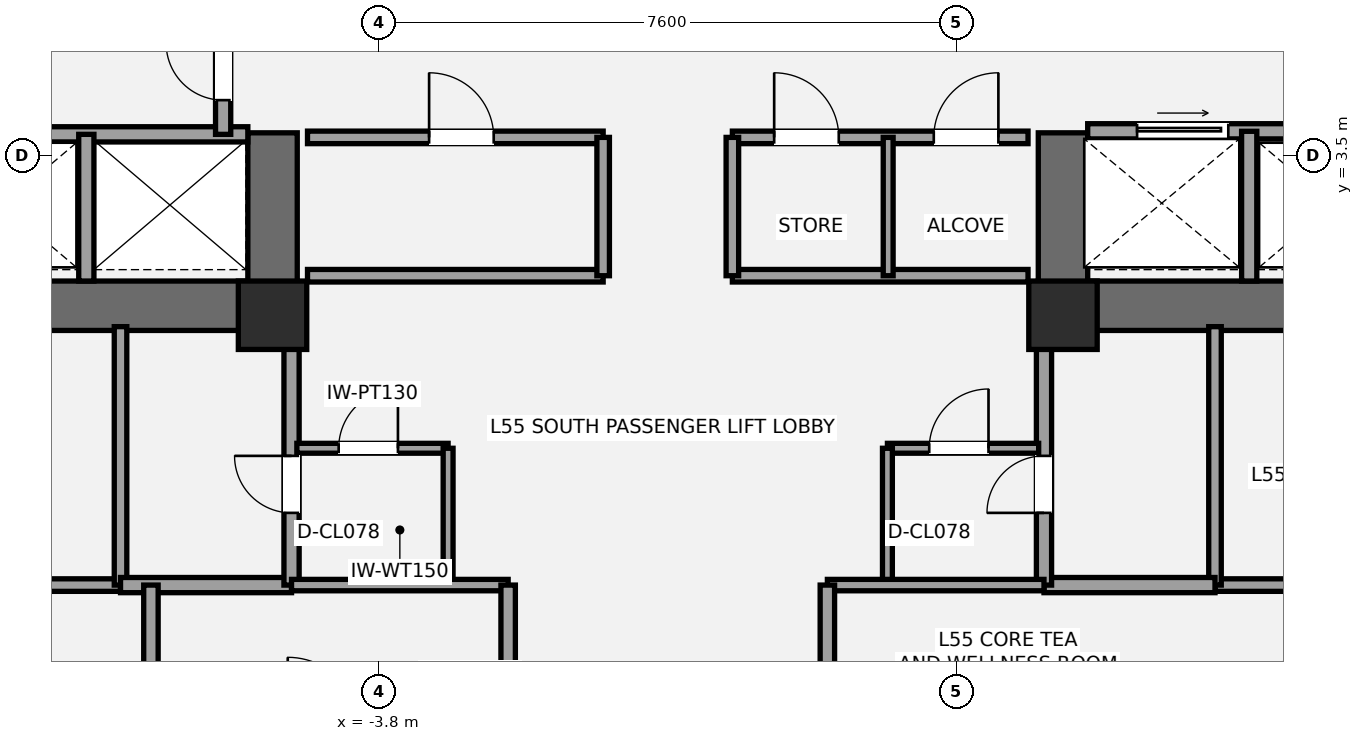
"""IFC4 building model, lengths in metres.
Left out: names, types, materials, properties, quantities, classifications, styles, units other than length and angle.
Written with IfcOpenShell. Run it as: python <this file> out.ifc"""

import sys

from ifc_helpers import new_model, si_unit, direction, frame, frame_2d, origin, origin_2d, place, context, subcontext, project, spatial, rectangle, extrude, element, fill, save


model = new_model("IFC4")
c1 = context("Model", 3, precision=1e-05, world=origin(), true_north=direction((0.0, 1.0)))
c2 = subcontext(c1, "Body", "Model", "MODEL_VIEW")
j1 = project(units=[si_unit("LENGTHUNIT", "METRE"), si_unit("PLANEANGLEUNIT", "RADIAN")], contexts=[c1])
p1 = place(None, origin())
s1 = spatial("IfcSite", under=j1, at=p1, CompositionType="ELEMENT")
p2 = place(p1, origin())
s2 = spatial("IfcBuilding", under=s1, at=p2, CompositionType="ELEMENT")
p3 = place(p2, frame((0.0, 0.0, 198.2)))
s3 = spatial("IfcBuildingStorey", under=s2, at=p3, CompositionType="ELEMENT", Elevation=198.2)
p4 = place(p3, frame((-4.875, 1.525, 0.0), z_axis=(0.0, 0.0, 1.0), x_axis=(-1.0, 0.0, 0.0)))
e1 = element("IfcWall", 1, at=p4, inside=s3, PredefinedType="SHEAR", context=c2, shape_type="SweptSolid", body=[
    extrude(rectangle(XDim=8.925, YDim=0.65, at=frame_2d((4.462, 0.0))), origin(), (0.0, 0.0, 1.0), 3.2),
])
p5 = place(p4, frame((5.425, 0.0, 0.0)))
e2 = element("IfcOpeningElement", 2, at=p5, cuts=e1, PredefinedType="OPENING", context=c2, shape_type="SweptSolid", body=[
    extrude(rectangle(XDim=1.05, YDim=2.15, at=frame_2d((0.525, 1.075))), frame((0.0, 0.335, 0.0), z_axis=(0.0, -1.0, 0.0), x_axis=(1.0, 0.0, 0.0)), (0.0, 0.0, 1.0), 0.67),
])
p6 = place(p4, frame((3.755, 0.0, 0.0)))
e3 = element("IfcOpeningElement", 3, at=p6, cuts=e1, PredefinedType="OPENING", context=c2, shape_type="SweptSolid", body=[
    extrude(rectangle(XDim=1.1, YDim=2.2, at=frame_2d((0.55, 1.1))), frame((0.0, 0.335, 0.0), z_axis=(0.0, -1.0, 0.0), x_axis=(1.0, 0.0, 0.0)), (0.0, 0.0, 1.0), 0.67),
])
p7 = place(p3, frame((-5.2, 1.2, 0.0), z_axis=(0.0, 0.0, 1.0), x_axis=(0.0, 1.0, 0.0)))
e4 = element("IfcWall", 4, at=p7, inside=s3, PredefinedType="SHEAR", context=c2, shape_type="SweptSolid", body=[
    extrude(rectangle(XDim=2.6, YDim=0.65, at=frame_2d((1.3, 0.0))), origin(), (0.0, 0.0, 1.0), 3.2),
])
p8 = place(p3, frame((13.8, 1.525, 0.0), z_axis=(0.0, 0.0, 1.0), x_axis=(-1.0, 0.0, 0.0)))
e5 = element("IfcWall", 5, at=p8, inside=s3, PredefinedType="SHEAR", context=c2, shape_type="SweptSolid", body=[
    extrude(rectangle(XDim=8.925, YDim=0.65, at=frame_2d((4.462, 0.0))), origin(), (0.0, 0.0, 1.0), 3.2),
])
p9 = place(p8, frame((2.45, 0.0, 0.0)))
e6 = element("IfcOpeningElement", 6, at=p9, cuts=e5, PredefinedType="OPENING", context=c2, shape_type="SweptSolid", body=[
    extrude(rectangle(XDim=1.05, YDim=2.15, at=frame_2d((0.525, 1.075))), frame((0.0, 0.335, 0.0), z_axis=(0.0, -1.0, 0.0), x_axis=(1.0, 0.0, 0.0)), (0.0, 0.0, 1.0), 0.67),
])
p10 = place(p8, frame((4.45, 0.0, 0.0)))
e7 = element("IfcOpeningElement", 7, at=p10, cuts=e5, PredefinedType="OPENING", context=c2, shape_type="SweptSolid", body=[
    extrude(rectangle(XDim=1.1, YDim=2.2, at=frame_2d((0.55, 1.1))), frame((0.0, 0.335, 0.0), z_axis=(0.0, -1.0, 0.0), x_axis=(1.0, 0.0, 0.0)), (0.0, 0.0, 1.0), 0.67),
])
p11 = place(p3, frame((5.2, 1.2, 0.0), z_axis=(0.0, 0.0, 1.0), x_axis=(0.0, 1.0, 0.0)))
e8 = element("IfcWall", 8, at=p11, inside=s3, PredefinedType="SHEAR", context=c2, shape_type="SweptSolid", body=[
    extrude(rectangle(XDim=2.6, YDim=0.65, at=frame_2d((1.3, 0.0))), origin(), (0.0, 0.0, 1.0), 3.2),
])
for number, where, z_axis, x_axis in (
    (9, (-5.2, 1.4, 0.0), (0.0, 0.0, 1.0), (1.0, 0.0, 0.0)),
    (10, (5.2, 1.4, 0.0), (0.0, 0.0, 1.0), (1.0, 0.0, 0.0)),
):
    element("IfcColumn", number, at=place(p3, frame(where, z_axis=z_axis, x_axis=x_axis)), inside=s3, PredefinedType="COLUMN", context=c2, shape_type="SweptSolid", body=[
        extrude(rectangle(XDim=0.9, YDim=0.9, at=origin_2d()), origin(), (0.0, 0.0, 1.0), 3.2),
    ])
p12 = place(p3, frame((-13.45, -2.15, 0.0), z_axis=(0.0, 0.0, 1.0), x_axis=(1.0, 0.0, 0.0)))
e11 = element("IfcWall", 11, at=p12, inside=s3, PredefinedType="PARTITIONING", context=c2, shape_type="SweptSolid", body=[
    extrude(rectangle(XDim=6.25, YDim=0.165, at=frame_2d((3.125, 0.0))), origin(), (0.0, 0.0, 1.0), 2.96),
])
p13 = place(p3, frame((-7.2, -2.15, 0.0), z_axis=(0.0, 0.0, 1.0), x_axis=(0.0, 1.0, 0.0)))
e12 = element("IfcWall", 12, at=p13, inside=s3, PredefinedType="PARTITIONING", context=c2, shape_type="SweptSolid", body=[
    extrude(rectangle(XDim=3.4, YDim=0.165, at=frame_2d((1.7, 0.0))), origin(), (0.0, 0.0, 1.0), 2.96),
])
p14 = place(p3, frame((-7.2, -2.15, 0.0), z_axis=(0.0, 0.0, 1.0), x_axis=(1.0, 0.0, 0.0)))
e13 = element("IfcWall", 13, at=p14, inside=s3, PredefinedType="SOLIDWALL", context=c2, shape_type="SweptSolid", body=[
    extrude(rectangle(XDim=2.25, YDim=0.2, at=frame_2d((1.125, 0.0))), origin(), (0.0, 0.0, 1.0), 2.96),
])
p15 = place(p3, frame((-4.95, -2.15, 0.0), z_axis=(0.0, 0.0, 1.0), x_axis=(0.0, 1.0, 0.0)))
e14 = element("IfcWall", 14, at=p15, inside=s3, PredefinedType="SOLIDWALL", context=c2, shape_type="SweptSolid", body=[
    extrude(rectangle(XDim=3.4, YDim=0.2, at=frame_2d((1.7, 0.0))), origin(), (0.0, 0.0, 1.0), 2.413),
])
p16 = place(p15, frame((0.95, 0.0, 0.0)))
e15 = element("IfcOpeningElement", 15, at=p16, cuts=e14, PredefinedType="OPENING", context=c2, shape_type="SweptSolid", body=[
    extrude(rectangle(XDim=0.75, YDim=2.1, at=frame_2d((0.375, 1.05))), frame((0.0, 0.11, 0.0), z_axis=(0.0, -1.0, 0.0), x_axis=(1.0, 0.0, 0.0)), (0.0, 0.0, 1.0), 0.22),
])
p17 = place(p3, frame((7.2, -2.15, 0.0), z_axis=(0.0, 0.0, 1.0), x_axis=(1.0, 0.0, 0.0)))
e16 = element("IfcWall", 16, at=p17, inside=s3, PredefinedType="PARTITIONING", context=c2, shape_type="SweptSolid", body=[
    extrude(rectangle(XDim=6.25, YDim=0.165, at=frame_2d((3.125, 0.0))), origin(), (0.0, 0.0, 1.0), 2.96),
])
p18 = place(p3, frame((7.2, -2.15, 0.0), z_axis=(0.0, 0.0, 1.0), x_axis=(0.0, 1.0, 0.0)))
e17 = element("IfcWall", 17, at=p18, inside=s3, PredefinedType="PARTITIONING", context=c2, shape_type="SweptSolid", body=[
    extrude(rectangle(XDim=3.4, YDim=0.165, at=frame_2d((1.7, 0.0))), origin(), (0.0, 0.0, 1.0), 2.413),
])
p19 = place(p3, frame((4.95, -2.15, 0.0), z_axis=(0.0, 0.0, 1.0), x_axis=(1.0, 0.0, 0.0)))
e18 = element("IfcWall", 18, at=p19, inside=s3, PredefinedType="SOLIDWALL", context=c2, shape_type="SweptSolid", body=[
    extrude(rectangle(XDim=2.25, YDim=0.2, at=frame_2d((1.125, 0.0))), origin(), (0.0, 0.0, 1.0), 2.96),
])
p20 = place(p3, frame((4.95, -2.15, 0.0), z_axis=(0.0, 0.0, 1.0), x_axis=(0.0, 1.0, 0.0)))
e19 = element("IfcWall", 19, at=p20, inside=s3, PredefinedType="SOLIDWALL", context=c2, shape_type="SweptSolid", body=[
    extrude(rectangle(XDim=3.4, YDim=0.2, at=frame_2d((1.7, 0.0))), origin(), (0.0, 0.0, 1.0), 2.413),
])
p21 = place(p20, frame((0.95, 0.0, 0.0)))
e20 = element("IfcOpeningElement", 20, at=p21, cuts=e19, PredefinedType="OPENING", context=c2, shape_type="SweptSolid", body=[
    extrude(rectangle(XDim=0.75, YDim=2.1, at=frame_2d((0.375, 1.05))), frame((0.0, 0.11, 0.0), z_axis=(0.0, -1.0, 0.0), x_axis=(1.0, 0.0, 0.0)), (0.0, 0.0, 1.0), 0.22),
])
p22 = place(p3, frame((-4.88, -0.35, 0.0), z_axis=(0.0, 0.0, 1.0), x_axis=(1.0, 0.0, 0.0)))
e21 = element("IfcWall", 21, at=p22, inside=s3, PredefinedType="PARTITIONING", context=c2, shape_type="SweptSolid", body=[
    extrude(rectangle(XDim=1.99, YDim=0.13, at=frame_2d((0.995, 0.0))), origin(), (0.0, 0.0, 1.0), 2.96),
])
p23 = place(p22, frame((0.55, 0.0, 0.0)))
e22 = element("IfcOpeningElement", 22, at=p23, cuts=e21, PredefinedType="OPENING", context=c2, shape_type="SweptSolid", body=[
    extrude(rectangle(XDim=0.78, YDim=2.1, at=frame_2d((0.39, 1.05))), frame((0.0, 0.075, 0.0), z_axis=(0.0, -1.0, 0.0), x_axis=(1.0, 0.0, 0.0)), (0.0, 0.0, 1.0), 0.15),
])
p24 = place(p3, frame((-2.89, -2.15, 0.0), z_axis=(0.0, 0.0, 1.0), x_axis=(0.0, 1.0, 0.0)))
e23 = element("IfcWall", 23, at=p24, inside=s3, PredefinedType="PARTITIONING", context=c2, shape_type="SweptSolid", body=[
    extrude(rectangle(XDim=1.8, YDim=0.13, at=frame_2d((0.9, 0.0))), origin(), (0.0, 0.0, 1.0), 2.96),
])
p25 = place(p3, frame((2.89, -0.35, 0.0), z_axis=(0.0, 0.0, 1.0), x_axis=(1.0, 0.0, 0.0)))
e24 = element("IfcWall", 24, at=p25, inside=s3, PredefinedType="PARTITIONING", context=c2, shape_type="SweptSolid", body=[
    extrude(rectangle(XDim=1.99, YDim=0.13, at=frame_2d((0.995, 0.0))), origin(), (0.0, 0.0, 1.0), 2.96),
])
p26 = place(p25, frame((0.55, 0.0, 0.0)))
e25 = element("IfcOpeningElement", 25, at=p26, cuts=e24, PredefinedType="OPENING", context=c2, shape_type="SweptSolid", body=[
    extrude(rectangle(XDim=0.78, YDim=2.1, at=frame_2d((0.39, 1.05))), frame((0.0, 0.075, 0.0), z_axis=(0.0, -1.0, 0.0), x_axis=(1.0, 0.0, 0.0)), (0.0, 0.0, 1.0), 0.15),
])
p27 = place(p3, frame((2.89, -2.15, 0.0), z_axis=(0.0, 0.0, 1.0), x_axis=(0.0, 1.0, 0.0)))
e26 = element("IfcWall", 26, at=p27, inside=s3, PredefinedType="PARTITIONING", context=c2, shape_type="SweptSolid", body=[
    extrude(rectangle(XDim=1.8, YDim=0.13, at=frame_2d((0.9, 0.0))), origin(), (0.0, 0.0, 1.0), 2.96),
])
p28 = place(p3, frame((-9.78, 3.78, 0.0), z_axis=(0.0, 0.0, 1.0), x_axis=(1.0, 0.0, 0.0)))
e27 = element("IfcWall", 27, at=p28, inside=s3, PredefinedType="SOLIDWALL", context=c2, shape_type="SweptSolid", body=[
    extrude(rectangle(XDim=4.255, YDim=0.2, at=frame_2d((2.127, 0.0))), origin(), (0.0, 0.0, 1.0), 2.96),
])
p29 = place(p3, frame((-7.65, 1.85, 0.0), z_axis=(0.0, 0.0, 1.0), x_axis=(0.0, 1.0, 0.0)))
e28 = element("IfcWall", 28, at=p29, inside=s3, PredefinedType="SOLIDWALL", context=c2, shape_type="SweptSolid", body=[
    extrude(rectangle(XDim=1.93, YDim=0.2, at=frame_2d((0.965, 0.0))), origin(), (0.0, 0.0, 1.0), 2.96),
])
p30 = place(p3, frame((-5.85, 3.78, 0.0), z_axis=(0.0, 0.0, 1.0), x_axis=(0.0, 1.0, 0.0)))
e29 = element("IfcWall", 29, at=p30, inside=s3, PredefinedType="SOLIDWALL", context=c2, shape_type="SweptSolid", body=[
    extrude(rectangle(XDim=1.69, YDim=0.2, at=frame_2d((0.845, 0.0))), origin(), (0.0, 0.0, 1.0), 2.96),
])
p31 = place(p30, frame((0.45, 0.0, 0.0)))
e30 = element("IfcOpeningElement", 30, at=p31, cuts=e29, PredefinedType="OPENING", context=c2, shape_type="SweptSolid", body=[
    extrude(rectangle(XDim=0.75, YDim=2.1, at=frame_2d((0.375, 1.05))), frame((0.0, 0.11, 0.0), z_axis=(0.0, -1.0, 0.0), x_axis=(1.0, 0.0, 0.0)), (0.0, 0.0, 1.0), 0.22),
])
p32 = place(p3, frame((5.525, 3.82, 0.0), z_axis=(0.0, 0.0, 1.0), x_axis=(1.0, 0.0, 0.0)))
e31 = element("IfcWall", 31, at=p32, inside=s3, PredefinedType="SOLIDWALL", context=c2, shape_type="SweptSolid", body=[
    extrude(rectangle(XDim=4.255, YDim=0.2, at=frame_2d((2.127, 0.0))), origin(), (0.0, 0.0, 1.0), 2.96),
])
p33 = place(p32, frame((0.65, 0.0, 0.0)))
e32 = element("IfcOpeningElement", 32, at=p33, cuts=e31, PredefinedType="OPENING", context=c2, shape_type="SweptSolid", body=[
    extrude(rectangle(XDim=1.2, YDim=2.2, at=frame_2d((0.6, 1.1))), frame((0.0, 0.11, 0.0), z_axis=(0.0, -1.0, 0.0), x_axis=(1.0, 0.0, 0.0)), (0.0, 0.0, 1.0), 0.22),
])
p34 = place(p3, frame((7.65, 1.85, 0.0), z_axis=(0.0, 0.0, 1.0), x_axis=(0.0, 1.0, 0.0)))
e33 = element("IfcWall", 33, at=p34, inside=s3, PredefinedType="SOLIDWALL", context=c2, shape_type="SweptSolid", body=[
    extrude(rectangle(XDim=1.97, YDim=0.2, at=frame_2d((0.985, 0.0))), origin(), (0.0, 0.0, 1.0), 2.96),
])
p35 = place(p3, frame((-4.74, 1.92, 0.0), z_axis=(0.0, 0.0, 1.0), x_axis=(1.0, 0.0, 0.0)))
e34 = element("IfcWall", 34, at=p35, inside=s3, PredefinedType="PARTITIONING", context=c2, shape_type="SweptSolid", body=[
    extrude(rectangle(XDim=3.89, YDim=0.165, at=frame_2d((1.945, 0.0))), origin(), (0.0, 0.0, 1.0), 2.1),
])
p36 = place(p3, frame((-4.74, 3.74, 0.0), z_axis=(0.0, 0.0, 1.0), x_axis=(1.0, 0.0, 0.0)))
e35 = element("IfcWall", 35, at=p36, inside=s3, PredefinedType="PARTITIONING", context=c2, shape_type="SweptSolid", body=[
    extrude(rectangle(XDim=3.89, YDim=0.165, at=frame_2d((1.945, 0.0))), origin(), (0.0, 0.0, 1.0), 2.96),
])
p37 = place(p36, frame((1.6, 0.0, 0.0)))
e36 = element("IfcOpeningElement", 36, at=p37, cuts=e35, PredefinedType="OPENING", context=c2, shape_type="SweptSolid", body=[
    extrude(rectangle(XDim=0.85, YDim=2.1, at=frame_2d((0.425, 1.05))), frame((0.0, 0.093, 0.0), z_axis=(0.0, -1.0, 0.0), x_axis=(1.0, 0.0, 0.0)), (0.0, 0.0, 1.0), 0.185),
])
p38 = place(p3, frame((-0.85, 1.92, 0.0), z_axis=(0.0, 0.0, 1.0), x_axis=(0.0, 1.0, 0.0)))
e37 = element("IfcWall", 37, at=p38, inside=s3, PredefinedType="PARTITIONING", context=c2, shape_type="SweptSolid", body=[
    extrude(rectangle(XDim=1.82, YDim=0.165, at=frame_2d((0.91, 0.0))), origin(), (0.0, 0.0, 1.0), 2.96),
])
p39 = place(p3, frame((0.85, 1.92, 0.0), z_axis=(0.0, 0.0, 1.0), x_axis=(1.0, 0.0, 0.0)))
e38 = element("IfcWall", 38, at=p39, inside=s3, PredefinedType="PARTITIONING", context=c2, shape_type="SweptSolid", body=[
    extrude(rectangle(XDim=3.89, YDim=0.165, at=frame_2d((1.945, 0.0))), origin(), (0.0, 0.0, 1.0), 2.1),
])
p40 = place(p3, frame((0.85, 3.74, 0.0), z_axis=(0.0, 0.0, 1.0), x_axis=(1.0, 0.0, 0.0)))
e39 = element("IfcWall", 39, at=p40, inside=s3, PredefinedType="PARTITIONING", context=c2, shape_type="SweptSolid", body=[
    extrude(rectangle(XDim=3.89, YDim=0.165, at=frame_2d((1.945, 0.0))), origin(), (0.0, 0.0, 1.0), 2.96),
])
p41 = place(p40, frame((0.55, 0.0, 0.0)))
e40 = element("IfcOpeningElement", 40, at=p41, cuts=e39, PredefinedType="OPENING", context=c2, shape_type="SweptSolid", body=[
    extrude(rectangle(XDim=0.85, YDim=2.1, at=frame_2d((0.425, 1.05))), frame((0.0, 0.093, 0.0), z_axis=(0.0, -1.0, 0.0), x_axis=(1.0, 0.0, 0.0)), (0.0, 0.0, 1.0), 0.185),
])
p42 = place(p40, frame((2.65, 0.0, 0.0)))
e41 = element("IfcOpeningElement", 41, at=p42, cuts=e39, PredefinedType="OPENING", context=c2, shape_type="SweptSolid", body=[
    extrude(rectangle(XDim=0.85, YDim=2.1, at=frame_2d((0.425, 1.05))), frame((0.0, 0.093, 0.0), z_axis=(0.0, -1.0, 0.0), x_axis=(1.0, 0.0, 0.0)), (0.0, 0.0, 1.0), 0.185),
])
p43 = place(p3, frame((0.85, 1.92, 0.0), z_axis=(0.0, 0.0, 1.0), x_axis=(0.0, 1.0, 0.0)))
e42 = element("IfcWall", 42, at=p43, inside=s3, PredefinedType="PARTITIONING", context=c2, shape_type="SweptSolid", body=[
    extrude(rectangle(XDim=1.82, YDim=0.165, at=frame_2d((0.91, 0.0))), origin(), (0.0, 0.0, 1.0), 2.96),
])
p44 = place(p3, frame((2.9, 1.92, 0.0), z_axis=(0.0, 0.0, 1.0), x_axis=(0.0, 1.0, 0.0)))
e43 = element("IfcWall", 43, at=p44, inside=s3, PredefinedType="PARTITIONING", context=c2, shape_type="SweptSolid", body=[
    extrude(rectangle(XDim=1.82, YDim=0.13, at=frame_2d((0.91, 0.0))), origin(), (0.0, 0.0, 1.0), 2.96),
])
p45 = place(p3, frame((-4.95, -2.15, 0.0), z_axis=(0.0, 0.0, 1.0), x_axis=(1.0, 0.0, 0.0)))
e44 = element("IfcWall", 44, at=p45, inside=s3, PredefinedType="PLUMBINGWALL", context=c2, shape_type="SweptSolid", body=[
    extrude(rectangle(XDim=2.85, YDim=0.15, at=frame_2d((1.425, 0.0))), origin(), (0.0, 0.0, 1.0), 2.96),
])
for number, where, z_axis, x_axis in (
    (45, (-6.8, -4.05, 0.0), (0.0, 0.0, 1.0), (0.0, 1.0, 0.0)),
    (46, (-2.1, -4.05, 0.0), (0.0, 0.0, 1.0), (0.0, 1.0, 0.0)),
):
    element("IfcWall", number, at=place(p3, frame(where, z_axis=z_axis, x_axis=x_axis)), inside=s3, PredefinedType="PLUMBINGWALL", context=c2, shape_type="SweptSolid", body=[
        extrude(rectangle(XDim=1.9, YDim=0.19, at=frame_2d((0.95, 0.0))), origin(), (0.0, 0.0, 1.0), 2.96),
    ])
p46 = place(p3, frame((2.1, -2.15, 0.0), z_axis=(0.0, 0.0, 1.0), x_axis=(1.0, 0.0, 0.0)))
e47 = element("IfcWall", 47, at=p46, inside=s3, PredefinedType="PLUMBINGWALL", context=c2, shape_type="SweptSolid", body=[
    extrude(rectangle(XDim=2.85, YDim=0.15, at=frame_2d((1.425, 0.0))), origin(), (0.0, 0.0, 1.0), 2.413),
])
p47 = place(p3, frame((2.1, -4.05, 0.0), z_axis=(0.0, 0.0, 1.0), x_axis=(0.0, 1.0, 0.0)))
e48 = element("IfcWall", 48, at=p47, inside=s3, PredefinedType="PLUMBINGWALL", context=c2, shape_type="SweptSolid", body=[
    extrude(rectangle(XDim=1.9, YDim=0.19, at=frame_2d((0.95, 0.0))), origin(), (0.0, 0.0, 1.0), 2.96),
])
p48 = place(p16, origin())
e49 = element("IfcDoor", 49, at=p48, inside=s3, OperationType="SINGLE_SWING_RIGHT", PredefinedType="DOOR", context=c2, shape_type="SweptSolid", body=[
    extrude(rectangle(XDim=0.75, YDim=2.1, at=frame_2d((0.375, 1.05))), frame((0.0, 0.025, 0.0), z_axis=(0.0, -1.0, 0.0), x_axis=(1.0, 0.0, 0.0)), (0.0, 0.0, 1.0), 0.05),
])
fill(e15, e49)
p49 = place(p21, origin())
e50 = element("IfcDoor", 50, at=p49, inside=s3, OperationType="SINGLE_SWING_LEFT", PredefinedType="DOOR", context=c2, shape_type="SweptSolid", body=[
    extrude(rectangle(XDim=0.75, YDim=2.1, at=frame_2d((0.375, 1.05))), frame((0.0, 0.025, 0.0), z_axis=(0.0, -1.0, 0.0), x_axis=(1.0, 0.0, 0.0)), (0.0, 0.0, 1.0), 0.05),
])
fill(e20, e50)
p50 = place(p23, origin())
e51 = element("IfcDoor", 51, at=p50, inside=s3, OperationType="SINGLE_SWING_RIGHT", PredefinedType="DOOR", context=c2, shape_type="SweptSolid", body=[
    extrude(rectangle(XDim=0.78, YDim=2.1, at=frame_2d((0.39, 1.05))), frame((0.0, 0.025, 0.0), z_axis=(0.0, -1.0, 0.0), x_axis=(1.0, 0.0, 0.0)), (0.0, 0.0, 1.0), 0.05),
])
fill(e22, e51)
p51 = place(p26, origin())
e52 = element("IfcDoor", 52, at=p51, inside=s3, OperationType="SINGLE_SWING_RIGHT", PredefinedType="DOOR", context=c2, shape_type="SweptSolid", body=[
    extrude(rectangle(XDim=0.78, YDim=2.1, at=frame_2d((0.39, 1.05))), frame((0.0, 0.025, 0.0), z_axis=(0.0, -1.0, 0.0), x_axis=(1.0, 0.0, 0.0)), (0.0, 0.0, 1.0), 0.05),
])
fill(e25, e52)
p52 = place(p31, origin())
e53 = element("IfcDoor", 53, at=p52, inside=s3, OperationType="SINGLE_SWING_RIGHT", PredefinedType="DOOR", context=c2, shape_type="SweptSolid", body=[
    extrude(rectangle(XDim=0.75, YDim=2.1, at=frame_2d((0.375, 1.05))), frame((0.0, 0.025, 0.0), z_axis=(0.0, -1.0, 0.0), x_axis=(1.0, 0.0, 0.0)), (0.0, 0.0, 1.0), 0.05),
])
fill(e30, e53)
p53 = place(p33, origin())
e54 = element("IfcDoor", 54, at=p53, inside=s3, OperationType="SLIDING_TO_RIGHT", PredefinedType="DOOR", context=c2, shape_type="SweptSolid", body=[
    extrude(rectangle(XDim=1.2, YDim=2.2, at=frame_2d((0.6, 1.1))), frame((0.0, 0.025, 0.0), z_axis=(0.0, -1.0, 0.0), x_axis=(1.0, 0.0, 0.0)), (0.0, 0.0, 1.0), 0.05),
])
fill(e32, e54)
p54 = place(p37, origin())
e55 = element("IfcDoor", 55, at=p54, inside=s3, OperationType="SINGLE_SWING_LEFT", PredefinedType="DOOR", context=c2, shape_type="SweptSolid", body=[
    extrude(rectangle(XDim=0.85, YDim=2.1, at=frame_2d((0.425, 1.05))), frame((0.0, 0.025, 0.0), z_axis=(0.0, -1.0, 0.0), x_axis=(1.0, 0.0, 0.0)), (0.0, 0.0, 1.0), 0.05),
])
fill(e36, e55)
p55 = place(p41, origin())
e56 = element("IfcDoor", 56, at=p55, inside=s3, OperationType="SINGLE_SWING_LEFT", PredefinedType="DOOR", context=c2, shape_type="SweptSolid", body=[
    extrude(rectangle(XDim=0.85, YDim=2.1, at=frame_2d((0.425, 1.05))), frame((0.0, 0.025, 0.0), z_axis=(0.0, -1.0, 0.0), x_axis=(1.0, 0.0, 0.0)), (0.0, 0.0, 1.0), 0.05),
])
fill(e40, e56)
p56 = place(p42, origin())
e57 = element("IfcDoor", 57, at=p56, inside=s3, OperationType="SINGLE_SWING_RIGHT", PredefinedType="DOOR", context=c2, shape_type="SweptSolid", body=[
    extrude(rectangle(XDim=0.85, YDim=2.1, at=frame_2d((0.425, 1.05))), frame((0.0, 0.025, 0.0), z_axis=(0.0, -1.0, 0.0), x_axis=(1.0, 0.0, 0.0)), (0.0, 0.0, 1.0), 0.05),
])
fill(e41, e57)
save(model, sys.argv[1])
